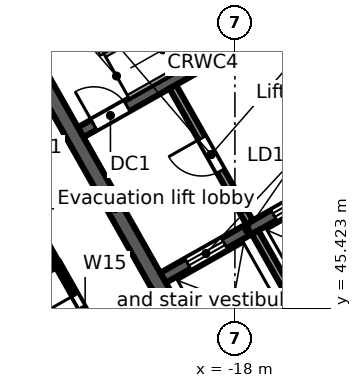
"""IFC4 building model, lengths in metres.
Left out: names, types, materials, properties, quantities, classifications, styles, units other than length and angle.
Written with IfcOpenShell. Run it as: python <this file> out.ifc"""

import sys

from ifc_helpers import new_model, si_unit, direction, frame, frame_2d, origin, place, context, subcontext, project, spatial, rectangle, extrude, element, fill, save


model = new_model("IFC4")
c1 = context("Model", 3, precision=1e-05, world=origin(), true_north=direction((0.0, 1.0)))
c2 = subcontext(c1, "Body", "Model", "MODEL_VIEW")
j1 = project(units=[si_unit("LENGTHUNIT", "METRE"), si_unit("PLANEANGLEUNIT", "RADIAN")], contexts=[c1])
p1 = place(None, origin())
s1 = spatial("IfcSite", under=j1, at=p1, CompositionType="ELEMENT")
p2 = place(p1, origin())
s2 = spatial("IfcBuilding", under=s1, at=p2, CompositionType="ELEMENT")
p3 = place(p2, frame((0.0, 0.0, 262.7)))
s3 = spatial("IfcBuildingStorey", under=s2, at=p3, CompositionType="ELEMENT", Elevation=262.7)
p4 = place(p3, frame((-58.732, 38.771, 0.0), z_axis=(0.0, 0.0, 1.0), x_axis=(0.870355615581, 0.492423702137, 0.0)))
e1 = element("IfcWall", 1, at=p4, inside=s3, PredefinedType="STANDARD", context=c2, shape_type="SweptSolid", body=[
    extrude(rectangle(XDim=64.052, YDim=0.25, at=frame_2d((32.026, 0.0))), origin(), (0.0, 0.0, 1.0), 3.52),
])
p5 = place(p4, frame((61.259, 0.0, 0.8)))
e2 = element("IfcOpeningElement", 2, at=p5, cuts=e1, PredefinedType="OPENING", context=c2, shape_type="SweptSolid", body=[
    extrude(rectangle(XDim=2.4, YDim=2.2, at=frame_2d((1.2, 1.1))), frame((0.0, 0.135, 0.0), z_axis=(0.0, -1.0, 0.0), x_axis=(1.0, 0.0, 0.0)), (0.0, 0.0, 1.0), 0.27),
])
p6 = place(p4, frame((58.216, 0.0, 0.8)))
e3 = element("IfcOpeningElement", 3, at=p6, cuts=e1, PredefinedType="OPENING", context=c2, shape_type="SweptSolid", body=[
    extrude(rectangle(XDim=2.4, YDim=2.2, at=frame_2d((1.2, 1.1))), frame((0.0, 0.135, 0.0), z_axis=(0.0, -1.0, 0.0), x_axis=(1.0, 0.0, 0.0)), (0.0, 0.0, 1.0), 0.27),
])
p7 = place(p4, frame((55.173, 0.0, 0.8)))
e4 = element("IfcOpeningElement", 4, at=p7, cuts=e1, PredefinedType="OPENING", context=c2, shape_type="SweptSolid", body=[
    extrude(rectangle(XDim=2.4, YDim=2.2, at=frame_2d((1.2, 1.1))), frame((0.0, 0.135, 0.0), z_axis=(0.0, -1.0, 0.0), x_axis=(1.0, 0.0, 0.0)), (0.0, 0.0, 1.0), 0.27),
])
p8 = place(p4, frame((52.129, 0.0, 0.8)))
e5 = element("IfcOpeningElement", 5, at=p8, cuts=e1, PredefinedType="OPENING", context=c2, shape_type="SweptSolid", body=[
    extrude(rectangle(XDim=2.4, YDim=2.2, at=frame_2d((1.2, 1.1))), frame((0.0, 0.135, 0.0), z_axis=(0.0, -1.0, 0.0), x_axis=(1.0, 0.0, 0.0)), (0.0, 0.0, 1.0), 0.27),
])
p9 = place(p4, frame((49.086, 0.0, 0.8)))
e6 = element("IfcOpeningElement", 6, at=p9, cuts=e1, PredefinedType="OPENING", context=c2, shape_type="SweptSolid", body=[
    extrude(rectangle(XDim=2.4, YDim=2.2, at=frame_2d((1.2, 1.1))), frame((0.0, 0.135, 0.0), z_axis=(0.0, -1.0, 0.0), x_axis=(1.0, 0.0, 0.0)), (0.0, 0.0, 1.0), 0.27),
])
p10 = place(p4, frame((46.043, 0.0, 0.8)))
e7 = element("IfcOpeningElement", 7, at=p10, cuts=e1, PredefinedType="OPENING", context=c2, shape_type="SweptSolid", body=[
    extrude(rectangle(XDim=2.4, YDim=2.2, at=frame_2d((1.2, 1.1))), frame((0.0, 0.135, 0.0), z_axis=(0.0, -1.0, 0.0), x_axis=(1.0, 0.0, 0.0)), (0.0, 0.0, 1.0), 0.27),
])
p11 = place(p4, frame((43.0, 0.0, 0.8)))
e8 = element("IfcOpeningElement", 8, at=p11, cuts=e1, PredefinedType="OPENING", context=c2, shape_type="SweptSolid", body=[
    extrude(rectangle(XDim=2.4, YDim=2.2, at=frame_2d((1.2, 1.1))), frame((0.0, 0.135, 0.0), z_axis=(0.0, -1.0, 0.0), x_axis=(1.0, 0.0, 0.0)), (0.0, 0.0, 1.0), 0.27),
])
p12 = place(p4, frame((39.956, 0.0, 0.8)))
e9 = element("IfcOpeningElement", 9, at=p12, cuts=e1, PredefinedType="OPENING", context=c2, shape_type="SweptSolid", body=[
    extrude(rectangle(XDim=2.4, YDim=2.2, at=frame_2d((1.2, 1.1))), frame((0.0, 0.135, 0.0), z_axis=(0.0, -1.0, 0.0), x_axis=(1.0, 0.0, 0.0)), (0.0, 0.0, 1.0), 0.27),
])
p13 = place(p4, frame((36.913, 0.0, 0.8)))
e10 = element("IfcOpeningElement", 10, at=p13, cuts=e1, PredefinedType="OPENING", context=c2, shape_type="SweptSolid", body=[
    extrude(rectangle(XDim=2.4, YDim=2.2, at=frame_2d((1.2, 1.1))), frame((0.0, 0.135, 0.0), z_axis=(0.0, -1.0, 0.0), x_axis=(1.0, 0.0, 0.0)), (0.0, 0.0, 1.0), 0.27),
])
p14 = place(p4, frame((33.87, 0.0, 0.8)))
e11 = element("IfcOpeningElement", 11, at=p14, cuts=e1, PredefinedType="OPENING", context=c2, shape_type="SweptSolid", body=[
    extrude(rectangle(XDim=2.4, YDim=2.2, at=frame_2d((1.2, 1.1))), frame((0.0, 0.135, 0.0), z_axis=(0.0, -1.0, 0.0), x_axis=(1.0, 0.0, 0.0)), (0.0, 0.0, 1.0), 0.27),
])
p15 = place(p4, frame((30.826, 0.0, 0.8)))
e12 = element("IfcOpeningElement", 12, at=p15, cuts=e1, PredefinedType="OPENING", context=c2, shape_type="SweptSolid", body=[
    extrude(rectangle(XDim=2.4, YDim=2.2, at=frame_2d((1.2, 1.1))), frame((0.0, 0.135, 0.0), z_axis=(0.0, -1.0, 0.0), x_axis=(1.0, 0.0, 0.0)), (0.0, 0.0, 1.0), 0.27),
])
p16 = place(p4, frame((27.783, 0.0, 0.8)))
e13 = element("IfcOpeningElement", 13, at=p16, cuts=e1, PredefinedType="OPENING", context=c2, shape_type="SweptSolid", body=[
    extrude(rectangle(XDim=2.4, YDim=2.2, at=frame_2d((1.2, 1.1))), frame((0.0, 0.135, 0.0), z_axis=(0.0, -1.0, 0.0), x_axis=(1.0, 0.0, 0.0)), (0.0, 0.0, 1.0), 0.27),
])
p17 = place(p4, frame((24.74, 0.0, 0.8)))
e14 = element("IfcOpeningElement", 14, at=p17, cuts=e1, PredefinedType="OPENING", context=c2, shape_type="SweptSolid", body=[
    extrude(rectangle(XDim=2.4, YDim=2.2, at=frame_2d((1.2, 1.1))), frame((0.0, 0.135, 0.0), z_axis=(0.0, -1.0, 0.0), x_axis=(1.0, 0.0, 0.0)), (0.0, 0.0, 1.0), 0.27),
])
p18 = place(p4, frame((21.696, 0.0, 0.8)))
e15 = element("IfcOpeningElement", 15, at=p18, cuts=e1, PredefinedType="OPENING", context=c2, shape_type="SweptSolid", body=[
    extrude(rectangle(XDim=2.4, YDim=2.2, at=frame_2d((1.2, 1.1))), frame((0.0, 0.135, 0.0), z_axis=(0.0, -1.0, 0.0), x_axis=(1.0, 0.0, 0.0)), (0.0, 0.0, 1.0), 0.27),
])
p19 = place(p4, frame((18.653, 0.0, 0.8)))
e16 = element("IfcOpeningElement", 16, at=p19, cuts=e1, PredefinedType="OPENING", context=c2, shape_type="SweptSolid", body=[
    extrude(rectangle(XDim=2.4, YDim=2.2, at=frame_2d((1.2, 1.1))), frame((0.0, 0.135, 0.0), z_axis=(0.0, -1.0, 0.0), x_axis=(1.0, 0.0, 0.0)), (0.0, 0.0, 1.0), 0.27),
])
p20 = place(p4, frame((15.61, 0.0, 0.8)))
e17 = element("IfcOpeningElement", 17, at=p20, cuts=e1, PredefinedType="OPENING", context=c2, shape_type="SweptSolid", body=[
    extrude(rectangle(XDim=2.4, YDim=2.2, at=frame_2d((1.2, 1.1))), frame((0.0, 0.135, 0.0), z_axis=(0.0, -1.0, 0.0), x_axis=(1.0, 0.0, 0.0)), (0.0, 0.0, 1.0), 0.27),
])
p21 = place(p4, frame((12.567, 0.0, 0.8)))
e18 = element("IfcOpeningElement", 18, at=p21, cuts=e1, PredefinedType="OPENING", context=c2, shape_type="SweptSolid", body=[
    extrude(rectangle(XDim=2.4, YDim=2.2, at=frame_2d((1.2, 1.1))), frame((0.0, 0.135, 0.0), z_axis=(0.0, -1.0, 0.0), x_axis=(1.0, 0.0, 0.0)), (0.0, 0.0, 1.0), 0.27),
])
p22 = place(p4, frame((9.523, 0.0, 0.8)))
e19 = element("IfcOpeningElement", 19, at=p22, cuts=e1, PredefinedType="OPENING", context=c2, shape_type="SweptSolid", body=[
    extrude(rectangle(XDim=2.4, YDim=2.2, at=frame_2d((1.2, 1.1))), frame((0.0, 0.135, 0.0), z_axis=(0.0, -1.0, 0.0), x_axis=(1.0, 0.0, 0.0)), (0.0, 0.0, 1.0), 0.27),
])
p23 = place(p4, frame((6.48, 0.0, 0.8)))
e20 = element("IfcOpeningElement", 20, at=p23, cuts=e1, PredefinedType="OPENING", context=c2, shape_type="SweptSolid", body=[
    extrude(rectangle(XDim=2.4, YDim=2.2, at=frame_2d((1.2, 1.1))), frame((0.0, 0.135, 0.0), z_axis=(0.0, -1.0, 0.0), x_axis=(1.0, 0.0, 0.0)), (0.0, 0.0, 1.0), 0.27),
])
p24 = place(p4, frame((3.437, 0.0, 0.8)))
e21 = element("IfcOpeningElement", 21, at=p24, cuts=e1, PredefinedType="OPENING", context=c2, shape_type="SweptSolid", body=[
    extrude(rectangle(XDim=2.4, YDim=2.2, at=frame_2d((1.2, 1.1))), frame((0.0, 0.135, 0.0), z_axis=(0.0, -1.0, 0.0), x_axis=(1.0, 0.0, 0.0)), (0.0, 0.0, 1.0), 0.27),
])
p25 = place(p4, frame((0.393, 0.0, 0.8)))
e22 = element("IfcOpeningElement", 22, at=p25, cuts=e1, PredefinedType="OPENING", context=c2, shape_type="SweptSolid", body=[
    extrude(rectangle(XDim=2.4, YDim=2.2, at=frame_2d((1.2, 1.1))), frame((0.0, 0.135, 0.0), z_axis=(0.0, -1.0, 0.0), x_axis=(1.0, 0.0, 0.0)), (0.0, 0.0, 1.0), 0.27),
])
p26 = place(p3, frame((-3.017, 46.293, 0.0), z_axis=(0.0, 0.0, 1.0), x_axis=(-0.870355474887, -0.492423950812, 0.0)))
e23 = element("IfcWall", 23, at=p26, inside=s3, PredefinedType="STANDARD", context=c2, shape_type="SweptSolid", body=[
    extrude(rectangle(XDim=40.34, YDim=0.25, at=frame_2d((20.17, 0.0))), origin(), (0.0, 0.0, 1.0), 3.52),
])
p27 = place(p26, frame((37.428, 0.0, 0.8)))
e24 = element("IfcOpeningElement", 24, at=p27, cuts=e23, PredefinedType="OPENING", context=c2, shape_type="SweptSolid", body=[
    extrude(rectangle(XDim=2.4, YDim=2.2, at=frame_2d((1.2, 1.1))), frame((0.0, 0.135, 0.0), z_axis=(0.0, -1.0, 0.0), x_axis=(1.0, 0.0, 0.0)), (0.0, 0.0, 1.0), 0.27),
])
p28 = place(p26, frame((34.372, 0.0, 0.0)))
e25 = element("IfcOpeningElement", 25, at=p28, cuts=e23, PredefinedType="OPENING", context=c2, shape_type="SweptSolid", body=[
    extrude(rectangle(XDim=1.8, YDim=2.4, at=frame_2d((0.9, 1.2))), frame((0.0, 0.135, 0.0), z_axis=(0.0, -1.0, 0.0), x_axis=(1.0, 0.0, 0.0)), (0.0, 0.0, 1.0), 0.27),
])
p29 = place(p26, frame((30.716, 0.0, 0.8)))
e26 = element("IfcOpeningElement", 26, at=p29, cuts=e23, PredefinedType="OPENING", context=c2, shape_type="SweptSolid", body=[
    extrude(rectangle(XDim=2.4, YDim=2.2, at=frame_2d((1.2, 1.1))), frame((0.0, 0.135, 0.0), z_axis=(0.0, -1.0, 0.0), x_axis=(1.0, 0.0, 0.0)), (0.0, 0.0, 1.0), 0.27),
])
p30 = place(p26, frame((27.36, 0.0, 0.8)))
e27 = element("IfcOpeningElement", 27, at=p30, cuts=e23, PredefinedType="OPENING", context=c2, shape_type="SweptSolid", body=[
    extrude(rectangle(XDim=2.4, YDim=2.2, at=frame_2d((1.2, 1.1))), frame((0.0, 0.135, 0.0), z_axis=(0.0, -1.0, 0.0), x_axis=(1.0, 0.0, 0.0)), (0.0, 0.0, 1.0), 0.27),
])
p31 = place(p26, frame((24.304, 0.0, 0.0)))
e28 = element("IfcOpeningElement", 28, at=p31, cuts=e23, PredefinedType="OPENING", context=c2, shape_type="SweptSolid", body=[
    extrude(rectangle(XDim=1.8, YDim=2.4, at=frame_2d((0.9, 1.2))), frame((0.0, 0.135, 0.0), z_axis=(0.0, -1.0, 0.0), x_axis=(1.0, 0.0, 0.0)), (0.0, 0.0, 1.0), 0.27),
])
p32 = place(p26, frame((20.648, 0.0, 0.8)))
e29 = element("IfcOpeningElement", 29, at=p32, cuts=e23, PredefinedType="OPENING", context=c2, shape_type="SweptSolid", body=[
    extrude(rectangle(XDim=2.4, YDim=2.2, at=frame_2d((1.2, 1.1))), frame((0.0, 0.135, 0.0), z_axis=(0.0, -1.0, 0.0), x_axis=(1.0, 0.0, 0.0)), (0.0, 0.0, 1.0), 0.27),
])
p33 = place(p26, frame((17.292, 0.0, 0.8)))
e30 = element("IfcOpeningElement", 30, at=p33, cuts=e23, PredefinedType="OPENING", context=c2, shape_type="SweptSolid", body=[
    extrude(rectangle(XDim=2.4, YDim=2.2, at=frame_2d((1.2, 1.1))), frame((0.0, 0.135, 0.0), z_axis=(0.0, -1.0, 0.0), x_axis=(1.0, 0.0, 0.0)), (0.0, 0.0, 1.0), 0.27),
])
p34 = place(p26, frame((14.236, 0.0, 0.0)))
e31 = element("IfcOpeningElement", 31, at=p34, cuts=e23, PredefinedType="OPENING", context=c2, shape_type="SweptSolid", body=[
    extrude(rectangle(XDim=1.8, YDim=2.4, at=frame_2d((0.9, 1.2))), frame((0.0, 0.135, 0.0), z_axis=(0.0, -1.0, 0.0), x_axis=(1.0, 0.0, 0.0)), (0.0, 0.0, 1.0), 0.27),
])
p35 = place(p26, frame((10.58, 0.0, 0.8)))
e32 = element("IfcOpeningElement", 32, at=p35, cuts=e23, PredefinedType="OPENING", context=c2, shape_type="SweptSolid", body=[
    extrude(rectangle(XDim=2.4, YDim=2.2, at=frame_2d((1.2, 1.1))), frame((0.0, 0.135, 0.0), z_axis=(0.0, -1.0, 0.0), x_axis=(1.0, 0.0, 0.0)), (0.0, 0.0, 1.0), 0.27),
])
p36 = place(p26, frame((7.224, 0.0, 0.8)))
e33 = element("IfcOpeningElement", 33, at=p36, cuts=e23, PredefinedType="OPENING", context=c2, shape_type="SweptSolid", body=[
    extrude(rectangle(XDim=2.4, YDim=2.2, at=frame_2d((1.2, 1.1))), frame((0.0, 0.135, 0.0), z_axis=(0.0, -1.0, 0.0), x_axis=(1.0, 0.0, 0.0)), (0.0, 0.0, 1.0), 0.27),
])
p37 = place(p26, frame((4.168, 0.0, 0.0)))
e34 = element("IfcOpeningElement", 34, at=p37, cuts=e23, PredefinedType="OPENING", context=c2, shape_type="SweptSolid", body=[
    extrude(rectangle(XDim=1.8, YDim=2.4, at=frame_2d((0.9, 1.2))), frame((0.0, 0.135, 0.0), z_axis=(0.0, -1.0, 0.0), x_axis=(1.0, 0.0, 0.0)), (0.0, 0.0, 1.0), 0.27),
])
p38 = place(p26, frame((0.512, 0.0, 0.8)))
e35 = element("IfcOpeningElement", 35, at=p38, cuts=e23, PredefinedType="OPENING", context=c2, shape_type="SweptSolid", body=[
    extrude(rectangle(XDim=2.4, YDim=2.2, at=frame_2d((1.2, 1.1))), frame((0.0, 0.135, 0.0), z_axis=(0.0, -1.0, 0.0), x_axis=(1.0, 0.0, 0.0)), (0.0, 0.0, 1.0), 0.27),
])
p39 = place(p3, frame((-17.975, 42.017, 0.0), z_axis=(0.0, 0.0, 1.0), x_axis=(0.87034965173, 0.492434243055, 0.0)))
e36 = element("IfcWall", 36, at=p39, inside=s3, PredefinedType="SOLIDWALL", context=c2, shape_type="SweptSolid", body=[
    extrude(rectangle(XDim=15.0, YDim=0.4, at=frame_2d((7.5, 0.0))), origin(), (0.0, 0.0, 1.0), 3.52),
])
p40 = place(p39, frame((6.1, 0.0, 0.0)))
e37 = element("IfcOpeningElement", 37, at=p40, cuts=e36, PredefinedType="OPENING", context=c2, shape_type="SweptSolid", body=[
    extrude(rectangle(XDim=1.2, YDim=2.1, at=frame_2d((0.6, 1.05))), frame((0.0, 0.21, 0.0), z_axis=(0.0, -1.0, 0.0), x_axis=(1.0, 0.0, 0.0)), (0.0, 0.0, 1.0), 0.42),
])
p41 = place(p3, frame((-19.892, 46.218, 0.0), z_axis=(0.0, 0.0, 1.0), x_axis=(0.870341639186, 0.492448404505, 0.0)))
e38 = element("IfcWall", 38, at=p41, inside=s3, PredefinedType="SOLIDWALL", context=c2, shape_type="SweptSolid", body=[
    extrude(rectangle(XDim=5.1, YDim=0.3, at=frame_2d((2.55, 0.0))), origin(), (0.0, 0.0, 1.0), 3.52),
])
p42 = place(p41, frame((0.75, 0.0, 0.0)))
e39 = element("IfcOpeningElement", 39, at=p42, cuts=e38, PredefinedType="OPENING", context=c2, shape_type="SweptSolid", body=[
    extrude(rectangle(XDim=1.1, YDim=2.1, at=frame_2d((0.55, 1.05))), frame((0.0, 0.16, 0.0), z_axis=(0.0, -1.0, 0.0), x_axis=(1.0, 0.0, 0.0)), (0.0, 0.0, 1.0), 0.32),
])
p43 = place(p41, frame((3.35, 0.0, 0.0)))
e40 = element("IfcOpeningElement", 40, at=p43, cuts=e38, PredefinedType="OPENING", context=c2, shape_type="SweptSolid", body=[
    extrude(rectangle(XDim=1.1, YDim=2.1, at=frame_2d((0.55, 1.05))), frame((0.0, 0.16, 0.0), z_axis=(0.0, -1.0, 0.0), x_axis=(1.0, 0.0, 0.0)), (0.0, 0.0, 1.0), 0.32),
])
p44 = place(p3, frame((-22.059, 50.047, 0.0), z_axis=(0.0, 0.0, 1.0), x_axis=(0.87035077051, 0.49243226567, 0.0)))
e41 = element("IfcWall", 41, at=p44, inside=s3, PredefinedType="SOLIDWALL", context=c2, shape_type="SweptSolid", body=[
    extrude(rectangle(XDim=7.4, YDim=0.3, at=frame_2d((3.7, 0.0))), origin(), (0.0, 0.0, 1.0), 3.52),
])
p45 = place(p44, frame((0.4, 0.0, 0.0)))
e42 = element("IfcOpeningElement", 42, at=p45, cuts=e41, PredefinedType="OPENING", context=c2, shape_type="SweptSolid", body=[
    extrude(rectangle(XDim=1.0, YDim=2.1, at=frame_2d((0.5, 1.05))), frame((0.0, 0.16, 0.0), z_axis=(0.0, -1.0, 0.0), x_axis=(1.0, 0.0, 0.0)), (0.0, 0.0, 1.0), 0.32),
])
p46 = place(p3, frame((-24.4, 53.779, 0.0), z_axis=(0.0, 0.0, 1.0), x_axis=(0.492421663121, -0.870356769198, 0.0)))
e43 = element("IfcWall", 43, at=p46, inside=s3, PredefinedType="SOLIDWALL", context=c2, shape_type="SweptSolid", body=[
    extrude(rectangle(XDim=13.2, YDim=0.4, at=frame_2d((6.6, 0.0))), origin(), (0.0, 0.0, 1.0), 3.52),
])
p47 = place(p3, frame((-17.469, 47.417, 0.0), z_axis=(0.0, 0.0, 1.0), x_axis=(0.492466057713, -0.870331650579, 0.0)))
e44 = element("IfcWall", 44, at=p47, inside=s3, PredefinedType="SOLIDWALL", context=c2, shape_type="SweptSolid", body=[
    extrude(rectangle(XDim=4.25, YDim=0.2, at=frame_2d((2.125, 0.0))), origin(), (0.0, 0.0, 1.0), 3.52),
])
p48 = place(p3, frame((-19.635, 51.246, 0.0), z_axis=(0.0, 0.0, 1.0), x_axis=(0.492408451753, -0.87036424366, 0.0)))
e45 = element("IfcWall", 45, at=p48, inside=s3, PredefinedType="PARTITIONING", context=c2, shape_type="SweptSolid", body=[
    extrude(rectangle(XDim=4.1, YDim=0.2, at=frame_2d((2.05, 0.0))), origin(), (0.0, 0.0, 1.0), 3.52),
])
p49 = place(p48, frame((1.55, 0.0, 0.0)))
e46 = element("IfcOpeningElement", 46, at=p49, cuts=e45, PredefinedType="OPENING", context=c2, shape_type="SweptSolid", body=[
    extrude(rectangle(XDim=1.0, YDim=2.1, at=frame_2d((0.5, 1.05))), frame((0.0, 0.11, 0.0), z_axis=(0.0, -1.0, 0.0), x_axis=(1.0, 0.0, 0.0)), (0.0, 0.0, 1.0), 0.22),
])
p50 = place(p3, frame((-28.119, 43.516, 0.0), z_axis=(0.0, 0.0, 1.0), x_axis=(0.870310250913, 0.49250387527, 0.0)))
e47 = element("IfcWall", 47, at=p50, inside=s3, PredefinedType="PARTITIONING", context=c2, shape_type="SweptSolid", body=[
    extrude(rectangle(XDim=6.25, YDim=0.15, at=frame_2d((3.125, 0.0))), origin(), (0.0, 0.0, 1.0), 2.792),
])
p51 = place(p3, frame((-24.649, 50.075, 0.0), z_axis=(0.0, 0.0, 1.0), x_axis=(0.492340861121, -0.870402479587, 0.0)))
e48 = element("IfcWall", 48, at=p51, inside=s3, PredefinedType="PARTITIONING", context=c2, shape_type="SweptSolid", body=[
    extrude(rectangle(XDim=3.999, YDim=0.125, at=frame_2d((2.0, 0.0))), origin(), (0.0, 0.0, 1.0), 2.792),
])
p52 = place(p51, frame((1.45, 0.0, 0.0)))
e49 = element("IfcOpeningElement", 49, at=p52, cuts=e48, PredefinedType="OPENING", context=c2, shape_type="SweptSolid", body=[
    extrude(rectangle(XDim=0.9, YDim=2.1, at=frame_2d((0.45, 1.05))), frame((0.0, 0.073, 0.0), z_axis=(0.0, -1.0, 0.0), x_axis=(1.0, 0.0, 0.0)), (0.0, 0.0, 1.0), 0.145),
])
p53 = place(p3, frame((-22.68, 46.594, 0.0), z_axis=(0.0, 0.0, 1.0), x_axis=(0.492612172641, -0.870248957119, 0.0)))
e50 = element("IfcWall", 50, at=p53, inside=s3, PredefinedType="PARTITIONING", context=c2, shape_type="SweptSolid", body=[
    extrude(rectangle(XDim=3.0, YDim=0.15, at=frame_2d((1.5, 0.0))), origin(), (0.0, 0.0, 1.0), 3.52),
])
p54 = place(p53, frame((0.95, 0.0, 0.0)))
e51 = element("IfcOpeningElement", 51, at=p54, cuts=e50, PredefinedType="OPENING", context=c2, shape_type="SweptSolid", body=[
    extrude(rectangle(XDim=0.9, YDim=2.1, at=frame_2d((0.45, 1.05))), frame((0.0, 0.085, 0.0), z_axis=(0.0, -1.0, 0.0), x_axis=(1.0, 0.0, 0.0)), (0.0, 0.0, 1.0), 0.17),
])
p55 = place(p42, origin())
e52 = element("IfcDoor", 52, at=p55, inside=s3, OperationType="DOUBLE_DOOR_SLIDING", PredefinedType="DOOR", context=c2, shape_type="SweptSolid", body=[
    extrude(rectangle(XDim=1.1, YDim=2.1, at=frame_2d((0.55, 1.05))), frame((0.0, 0.025, 0.0), z_axis=(0.0, -1.0, 0.0), x_axis=(1.0, 0.0, 0.0)), (0.0, 0.0, 1.0), 0.05),
])
fill(e39, e52)
p56 = place(p43, origin())
e53 = element("IfcDoor", 53, at=p56, inside=s3, OperationType="DOUBLE_DOOR_SLIDING", PredefinedType="DOOR", context=c2, shape_type="SweptSolid", body=[
    extrude(rectangle(XDim=1.1, YDim=2.1, at=frame_2d((0.55, 1.05))), frame((0.0, 0.025, 0.0), z_axis=(0.0, -1.0, 0.0), x_axis=(1.0, 0.0, 0.0)), (0.0, 0.0, 1.0), 0.05),
])
fill(e40, e53)
p57 = place(p45, origin())
e54 = element("IfcDoor", 54, at=p57, inside=s3, OperationType="SINGLE_SWING_LEFT", PredefinedType="DOOR", context=c2, shape_type="SweptSolid", body=[
    extrude(rectangle(XDim=1.0, YDim=2.1, at=frame_2d((0.5, 1.05))), frame((0.0, 0.025, 0.0), z_axis=(0.0, -1.0, 0.0), x_axis=(1.0, 0.0, 0.0)), (0.0, 0.0, 1.0), 0.05),
])
fill(e42, e54)
p58 = place(p49, frame((1.0, 0.0, 0.0), z_axis=(0.0, 0.0, 1.0), x_axis=(-1.0, 0.0, 0.0)))
e55 = element("IfcDoor", 55, at=p58, inside=s3, OperationType="SINGLE_SWING_RIGHT", PredefinedType="DOOR", context=c2, shape_type="SweptSolid", body=[
    extrude(rectangle(XDim=1.0, YDim=2.1, at=frame_2d((0.5, 1.05))), frame((0.0, 0.025, 0.0), z_axis=(0.0, -1.0, 0.0), x_axis=(1.0, 0.0, 0.0)), (0.0, 0.0, 1.0), 0.05),
])
fill(e46, e55)
p59 = place(p54, frame((0.9, 0.0, 0.0), z_axis=(0.0, 0.0, 1.0), x_axis=(-1.0, 0.0, 0.0)))
e56 = element("IfcDoor", 56, at=p59, inside=s3, OperationType="SINGLE_SWING_RIGHT", PredefinedType="DOOR", context=c2, shape_type="SweptSolid", body=[
    extrude(rectangle(XDim=0.9, YDim=2.1, at=frame_2d((0.45, 1.05))), frame((0.0, 0.025, 0.0), z_axis=(0.0, -1.0, 0.0), x_axis=(1.0, 0.0, 0.0)), (0.0, 0.0, 1.0), 0.05),
])
fill(e51, e56)
save(model, sys.argv[1])
